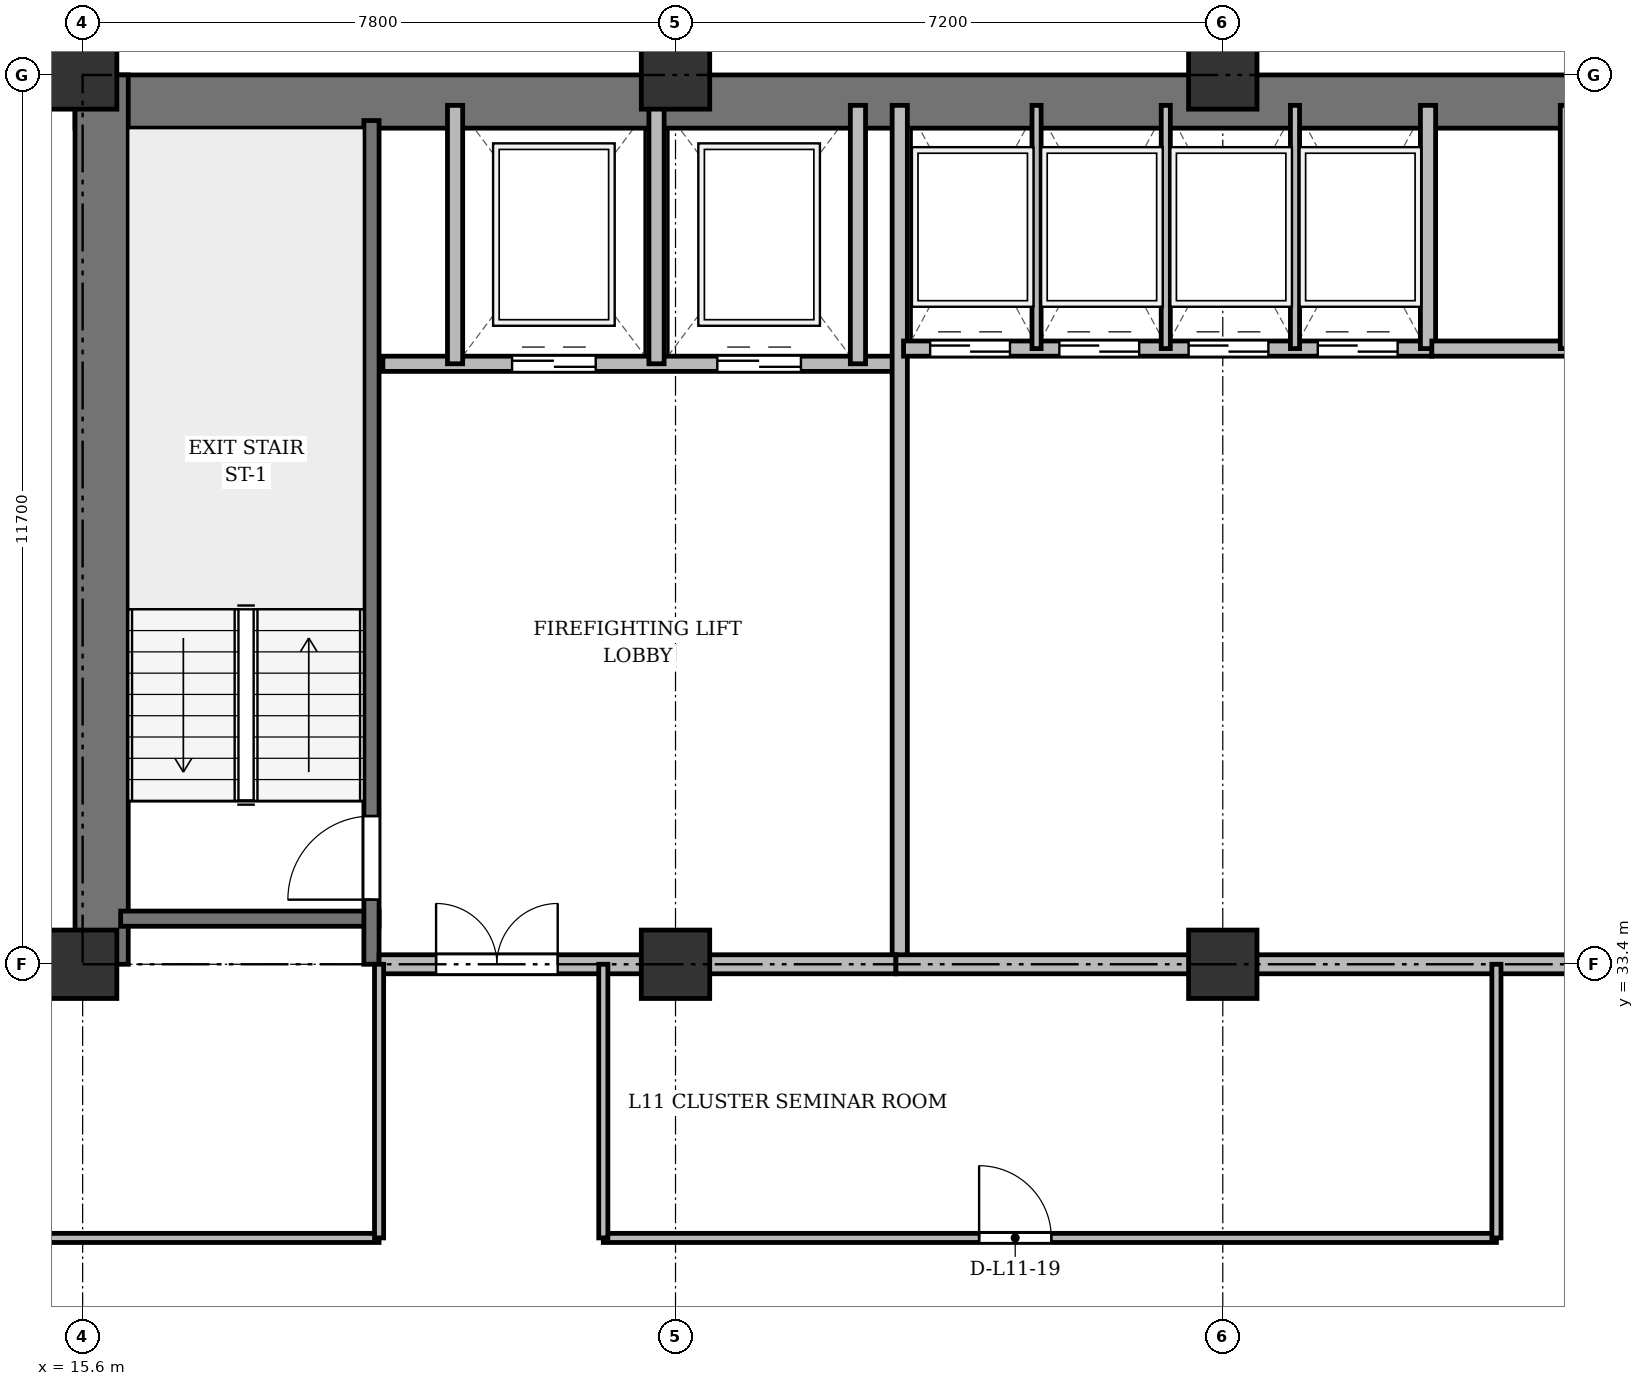
"""IFC4 building model, lengths in metres.
Left out: names, types, materials, properties, quantities, classifications, styles, units other than length and angle.
Written with IfcOpenShell. Run it as: python <this file> out.ifc"""

import sys

from ifc_helpers import new_model, si_unit, direction, frame, frame_2d, origin, origin_2d, place, context, subcontext, project, spatial, rectangle, extrude, source, transform, mapped, element, fill, save


model = new_model("IFC4")
c1 = context("Model", 3, precision=1e-05, world=origin(), true_north=direction((0.0, 1.0)))
c2 = subcontext(c1, "Body", "Model", "MODEL_VIEW")
j1 = project(units=[si_unit("LENGTHUNIT", "METRE"), si_unit("PLANEANGLEUNIT", "RADIAN")], contexts=[c1])
p1 = place(None, origin())
s1 = spatial("IfcSite", under=j1, at=p1, CompositionType="ELEMENT")
p2 = place(p1, origin())
s2 = spatial("IfcBuilding", under=s1, at=p2, CompositionType="ELEMENT")
p3 = place(p2, frame((0.0, 0.0, 45.1)))
s3 = spatial("IfcBuildingStorey", under=s2, at=p3, CompositionType="ELEMENT", Elevation=45.1)
m1 = source(origin(), c2, "Body", "SweptSolid", [
    extrude(rectangle(XDim=0.9, YDim=0.9, at=origin_2d()), origin(), (0.0, 0.0, 1.0), 3.6),
])
for number, where, z_axis, x_axis in (
    (1, (15.6, 33.4, 0.0), (0.0, 0.0, 1.0), (1.0, 0.0, 0.0)),
    (2, (15.6, 45.1, 0.0), (0.0, 0.0, 1.0), (1.0, 0.0, 0.0)),
    (3, (23.4, 33.4, 0.0), (0.0, 0.0, 1.0), (1.0, 0.0, 0.0)),
    (4, (23.4, 45.1, 0.0), (0.0, 0.0, 1.0), (1.0, 0.0, 0.0)),
    (5, (30.6, 33.4, 0.0), (0.0, 0.0, 1.0), (1.0, 0.0, 0.0)),
    (6, (30.6, 45.1, 0.0), (0.0, 0.0, 1.0), (1.0, 0.0, 0.0)),
):
    element("IfcColumn", number, at=place(p3, frame(where, z_axis=z_axis, x_axis=x_axis)), inside=s3, PredefinedType="COLUMN", context=c2, shape_type="MappedRepresentation", body=[
        mapped(m1, transform((0.0, 0.0, 0.0), x_axis=(1.0, 0.0, 0.0), y_axis=(0.0, 1.0, 0.0), z_axis=(0.0, 0.0, 1.0), scale=1.0)),
    ])
p4 = place(p3, frame((15.5, 44.75, 0.0), z_axis=(0.0, 0.0, 1.0), x_axis=(1.0, 0.0, 0.0)))
e7 = element("IfcWall", 7, at=p4, inside=s3, PredefinedType="SHEAR", context=c2, shape_type="SweptSolid", body=[
    extrude(rectangle(XDim=43.4, YDim=0.7, at=frame_2d((21.7, 0.0))), origin(), (0.0, 0.0, 1.0), 3.34),
])
p5 = place(p3, frame((15.85, 33.4, 0.0), z_axis=(0.0, 0.0, 1.0), x_axis=(0.0, 1.0, 0.0)))
e8 = element("IfcWall", 8, at=p5, inside=s3, PredefinedType="SHEAR", context=c2, shape_type="SweptSolid", body=[
    extrude(rectangle(XDim=11.7, YDim=0.7, at=frame_2d((5.85, 0.0))), origin(), (0.0, 0.0, 1.0), 3.34),
])
p6 = place(p3, frame((16.1, 34.0, 0.0), z_axis=(0.0, 0.0, 1.0), x_axis=(1.0, 0.0, 0.0)))
e9 = element("IfcWall", 9, at=p6, inside=s3, PredefinedType="SHEAR", context=c2, shape_type="SweptSolid", body=[
    extrude(rectangle(XDim=3.4, YDim=0.2, at=frame_2d((1.7, 0.0))), origin(), (0.0, 0.0, 1.0), 3.34),
])
p7 = place(p3, frame((19.4, 33.4, 0.0), z_axis=(0.0, 0.0, 1.0), x_axis=(0.0, 1.0, 0.0)))
e10 = element("IfcWall", 10, at=p7, inside=s3, PredefinedType="SHEAR", context=c2, shape_type="SweptSolid", body=[
    extrude(rectangle(XDim=11.1, YDim=0.2, at=frame_2d((5.55, 0.0))), origin(), (0.0, 0.0, 1.0), 3.34),
])
p8 = place(p7, frame((0.85, 0.0, 0.0)))
e11 = element("IfcOpeningElement", 11, at=p8, cuts=e10, PredefinedType="OPENING", context=c2, shape_type="SweptSolid", body=[
    extrude(rectangle(XDim=1.1, YDim=2.15, at=frame_2d((0.55, 1.075))), frame((0.0, 0.11, 0.0), z_axis=(0.0, -1.0, 0.0), x_axis=(1.0, 0.0, 0.0)), (0.0, 0.0, 1.0), 0.22),
])
p9 = place(p3, frame((19.55, 41.3, 0.0), z_axis=(0.0, 0.0, 1.0), x_axis=(1.0, 0.0, 0.0)))
e12 = element("IfcWall", 12, at=p9, inside=s3, PredefinedType="SOLIDWALL", context=c2, shape_type="SweptSolid", body=[
    extrude(rectangle(XDim=6.75, YDim=0.2, at=frame_2d((3.375, 0.0))), origin(), (0.0, 0.0, 1.0), 3.34),
])
p10 = place(p9, frame((1.7, 0.0, 0.0)))
e13 = element("IfcOpeningElement", 13, at=p10, cuts=e12, PredefinedType="OPENING", context=c2, shape_type="SweptSolid", body=[
    extrude(rectangle(XDim=1.1, YDim=2.15, at=frame_2d((0.55, 1.075))), frame((0.0, 0.11, 0.0), z_axis=(0.0, -1.0, 0.0), x_axis=(1.0, 0.0, 0.0)), (0.0, 0.0, 1.0), 0.22),
])
p11 = place(p9, frame((4.4, 0.0, 0.0)))
e14 = element("IfcOpeningElement", 14, at=p11, cuts=e12, PredefinedType="OPENING", context=c2, shape_type="SweptSolid", body=[
    extrude(rectangle(XDim=1.1, YDim=2.15, at=frame_2d((0.55, 1.075))), frame((0.0, 0.11, 0.0), z_axis=(0.0, -1.0, 0.0), x_axis=(1.0, 0.0, 0.0)), (0.0, 0.0, 1.0), 0.22),
])
for number, where, z_axis, x_axis in (
    (15, (20.5, 41.3, 0.0), (0.0, 0.0, 1.0), (0.0, 1.0, 0.0)),
    (16, (23.15, 41.3, 0.0), (0.0, 0.0, 1.0), (0.0, 1.0, 0.0)),
    (17, (25.8, 41.3, 0.0), (0.0, 0.0, 1.0), (0.0, 1.0, 0.0)),
):
    element("IfcWall", number, at=place(p3, frame(where, z_axis=z_axis, x_axis=x_axis)), inside=s3, PredefinedType="SOLIDWALL", context=c2, shape_type="SweptSolid", body=[
        extrude(rectangle(XDim=3.4, YDim=0.2, at=frame_2d((1.7, 0.0))), origin(), (0.0, 0.0, 1.0), 3.34),
    ])
p12 = place(p3, frame((26.35, 33.4, 0.0), z_axis=(0.0, 0.0, 1.0), x_axis=(0.0, 1.0, 0.0)))
e18 = element("IfcWall", 18, at=p12, inside=s3, PredefinedType="SOLIDWALL", context=c2, shape_type="SweptSolid", body=[
    extrude(rectangle(XDim=11.3, YDim=0.2, at=frame_2d((5.65, 0.0))), origin(), (0.0, 0.0, 1.0), 2.69),
])
p13 = place(p3, frame((19.5, 33.4, 0.0), z_axis=(0.0, 0.0, 1.0), x_axis=(1.0, 0.0, 0.0)))
e19 = element("IfcWall", 19, at=p13, inside=s3, PredefinedType="PARTITIONING", context=c2, shape_type="SweptSolid", body=[
    extrude(rectangle(XDim=6.8, YDim=0.25, at=frame_2d((3.4, 0.0))), origin(), (0.0, 0.0, 1.0), 2.69),
])
p14 = place(p13, frame((0.75, 0.0, 0.0)))
e20 = element("IfcOpeningElement", 20, at=p14, cuts=e19, PredefinedType="OPENING", context=c2, shape_type="SweptSolid", body=[
    extrude(rectangle(XDim=1.6, YDim=2.2, at=frame_2d((0.8, 1.1))), frame((0.0, 0.135, 0.0), z_axis=(0.0, -1.0, 0.0), x_axis=(1.0, 0.0, 0.0)), (0.0, 0.0, 1.0), 0.27),
])
p15 = place(p3, frame((26.4, 41.5, 0.0), z_axis=(0.0, 0.0, 1.0), x_axis=(1.0, 0.0, 0.0)))
e21 = element("IfcWall", 21, at=p15, inside=s3, PredefinedType="SOLIDWALL", context=c2, shape_type="SweptSolid", body=[
    extrude(rectangle(XDim=6.95, YDim=0.2, at=frame_2d((3.475, 0.0))), origin(), (0.0, 0.0, 1.0), 3.34),
])
p16 = place(p15, frame((0.35, 0.0, 0.0)))
e22 = element("IfcOpeningElement", 22, at=p16, cuts=e21, PredefinedType="OPENING", context=c2, shape_type="SweptSolid", body=[
    extrude(rectangle(XDim=1.05, YDim=2.15, at=frame_2d((0.525, 1.075))), frame((0.0, 0.11, 0.0), z_axis=(0.0, -1.0, 0.0), x_axis=(1.0, 0.0, 0.0)), (0.0, 0.0, 1.0), 0.22),
])
p17 = place(p15, frame((2.05, 0.0, 0.0)))
e23 = element("IfcOpeningElement", 23, at=p17, cuts=e21, PredefinedType="OPENING", context=c2, shape_type="SweptSolid", body=[
    extrude(rectangle(XDim=1.05, YDim=2.15, at=frame_2d((0.525, 1.075))), frame((0.0, 0.11, 0.0), z_axis=(0.0, -1.0, 0.0), x_axis=(1.0, 0.0, 0.0)), (0.0, 0.0, 1.0), 0.22),
])
p18 = place(p15, frame((3.75, 0.0, 0.0)))
e24 = element("IfcOpeningElement", 24, at=p18, cuts=e21, PredefinedType="OPENING", context=c2, shape_type="SweptSolid", body=[
    extrude(rectangle(XDim=1.05, YDim=2.15, at=frame_2d((0.525, 1.075))), frame((0.0, 0.11, 0.0), z_axis=(0.0, -1.0, 0.0), x_axis=(1.0, 0.0, 0.0)), (0.0, 0.0, 1.0), 0.22),
])
p19 = place(p15, frame((5.45, 0.0, 0.0)))
e25 = element("IfcOpeningElement", 25, at=p19, cuts=e21, PredefinedType="OPENING", context=c2, shape_type="SweptSolid", body=[
    extrude(rectangle(XDim=1.05, YDim=2.15, at=frame_2d((0.525, 1.075))), frame((0.0, 0.11, 0.0), z_axis=(0.0, -1.0, 0.0), x_axis=(1.0, 0.0, 0.0)), (0.0, 0.0, 1.0), 0.22),
])
p20 = place(p3, frame((33.3, 41.5, 0.0), z_axis=(0.0, 0.0, 1.0), x_axis=(0.0, 1.0, 0.0)))
e26 = element("IfcWall", 26, at=p20, inside=s3, PredefinedType="SOLIDWALL", context=c2, shape_type="SweptSolid", body=[
    extrude(rectangle(XDim=3.2, YDim=0.2, at=frame_2d((1.6, 0.0))), origin(), (0.0, 0.0, 1.0), 3.34),
])
for number, where, z_axis, x_axis in (
    (27, (28.15, 41.5, 0.0), (0.0, 0.0, 1.0), (0.0, 1.0, 0.0)),
    (28, (29.85, 41.5, 0.0), (0.0, 0.0, 1.0), (0.0, 1.0, 0.0)),
    (29, (31.55, 41.5, 0.0), (0.0, 0.0, 1.0), (0.0, 1.0, 0.0)),
):
    element("IfcWall", number, at=place(p3, frame(where, z_axis=z_axis, x_axis=x_axis)), inside=s3, PredefinedType="PARTITIONING", context=c2, shape_type="SweptSolid", body=[
        extrude(rectangle(XDim=3.2, YDim=0.12, at=frame_2d((1.6, 0.0))), origin(), (0.0, 0.0, 1.0), 3.34),
    ])
p21 = place(p3, frame((33.35, 41.5, 0.0), z_axis=(0.0, 0.0, 1.0), x_axis=(1.0, 0.0, 0.0)))
e30 = element("IfcWall", 30, at=p21, inside=s3, PredefinedType="SOLIDWALL", context=c2, shape_type="SweptSolid", body=[
    extrude(rectangle(XDim=6.9, YDim=0.2, at=frame_2d((3.45, 0.0))), origin(), (0.0, 0.0, 1.0), 3.34),
])
p22 = place(p3, frame((35.1, 41.5, 0.0), z_axis=(0.0, 0.0, 1.0), x_axis=(0.0, 1.0, 0.0)))
e31 = element("IfcWall", 31, at=p22, inside=s3, PredefinedType="PARTITIONING", context=c2, shape_type="SweptSolid", body=[
    extrude(rectangle(XDim=3.2, YDim=0.12, at=frame_2d((1.6, 0.0))), origin(), (0.0, 0.0, 1.0), 3.34),
])
p23 = place(p3, frame((26.3, 33.4, 0.0), z_axis=(0.0, 0.0, 1.0), x_axis=(1.0, 0.0, 0.0)))
e32 = element("IfcWall", 32, at=p23, inside=s3, PredefinedType="PARTITIONING", context=c2, shape_type="SweptSolid", body=[
    extrude(rectangle(XDim=20.85, YDim=0.25, at=frame_2d((10.425, 0.0))), origin(), (0.0, 0.0, 1.0), 2.69),
])
p24 = place(p23, frame((9.2, 0.0, 0.0)))
e33 = element("IfcOpeningElement", 33, at=p24, cuts=e32, PredefinedType="OPENING", context=c2, shape_type="SweptSolid", body=[
    extrude(rectangle(XDim=1.6, YDim=2.2, at=frame_2d((0.8, 1.1))), frame((0.0, 0.135, 0.0), z_axis=(0.0, -1.0, 0.0), x_axis=(1.0, 0.0, 0.0)), (0.0, 0.0, 1.0), 0.27),
])
p25 = place(p3, frame((4.75, 29.8, 0.0), z_axis=(0.0, 0.0, 1.0), x_axis=(1.0, 0.0, 0.0)))
e34 = element("IfcWall", 34, at=p25, inside=s3, PredefinedType="PARTITIONING", context=c2, shape_type="SweptSolid", body=[
    extrude(rectangle(XDim=14.75, YDim=0.12, at=frame_2d((7.375, 0.0))), origin(), (0.0, 0.0, 1.0), 2.752),
])
p26 = place(p25, frame((6.9, 0.0, 0.0)))
e35 = element("IfcOpeningElement", 35, at=p26, cuts=e34, PredefinedType="OPENING", context=c2, shape_type="SweptSolid", body=[
    extrude(rectangle(XDim=0.95, YDim=2.15, at=frame_2d((0.475, 1.075))), frame((0.0, 0.07, 0.0), z_axis=(0.0, -1.0, 0.0), x_axis=(1.0, 0.0, 0.0)), (0.0, 0.0, 1.0), 0.14),
])
p27 = place(p3, frame((22.45, 29.8, 0.0), z_axis=(0.0, 0.0, 1.0), x_axis=(1.0, 0.0, 0.0)))
e36 = element("IfcWall", 36, at=p27, inside=s3, PredefinedType="PARTITIONING", context=c2, shape_type="SweptSolid", body=[
    extrude(rectangle(XDim=11.75, YDim=0.12, at=frame_2d((5.875, 0.0))), origin(), (0.0, 0.0, 1.0), 2.752),
])
p28 = place(p27, frame((4.944, 0.0, 0.0)))
e37 = element("IfcOpeningElement", 37, at=p28, cuts=e36, PredefinedType="OPENING", context=c2, shape_type="SweptSolid", body=[
    extrude(rectangle(XDim=0.95, YDim=2.15, at=frame_2d((0.475, 1.075))), frame((0.0, 0.07, 0.0), z_axis=(0.0, -1.0, 0.0), x_axis=(1.0, 0.0, 0.0)), (0.0, 0.0, 1.0), 0.14),
])
for number, where, z_axis, x_axis in (
    (38, (19.5, 29.8, 0.0), (0.0, 0.0, 1.0), (0.0, 1.0, 0.0)),
    (39, (22.45, 29.8, 0.0), (0.0, 0.0, 1.0), (0.0, 1.0, 0.0)),
    (40, (34.2, 29.8, 0.0), (0.0, 0.0, 1.0), (0.0, 1.0, 0.0)),
):
    element("IfcWall", number, at=place(p3, frame(where, z_axis=z_axis, x_axis=x_axis)), inside=s3, PredefinedType="PARTITIONING", context=c2, shape_type="SweptSolid", body=[
        extrude(rectangle(XDim=3.6, YDim=0.12, at=frame_2d((1.8, 0.0))), origin(), (0.0, 0.0, 1.0), 2.69),
    ])
p29 = place(p3, frame((4.75, 33.4, 0.0), z_axis=(0.0, 0.0, 1.0), x_axis=(1.0, 0.0, 0.0)))
e41 = element("IfcWall", 41, at=p29, inside=s3, PredefinedType="PARTITIONING", context=c2, shape_type="SweptSolid", body=[
    extrude(rectangle(XDim=10.85, YDim=0.15, at=frame_2d((5.425, 0.0))), origin(), (0.0, 0.0, 1.0), 2.69),
])
p30 = place(p29, frame((4.94, 0.0, 0.0)))
e42 = element("IfcOpeningElement", 42, at=p30, cuts=e41, PredefinedType="OPENING", context=c2, shape_type="SweptSolid", body=[
    extrude(rectangle(XDim=0.95, YDim=2.15, at=frame_2d((0.475, 1.075))), frame((0.0, 0.085, 0.0), z_axis=(0.0, -1.0, 0.0), x_axis=(1.0, 0.0, 0.0)), (0.0, 0.0, 1.0), 0.17),
])
p31 = place(p3, frame((15.6, 44.75, 0.0), z_axis=(0.0, 0.0, 1.0), x_axis=(0.0, 1.0, 0.0)))
e43 = element("IfcWall", 43, at=p31, inside=s3, PredefinedType="PARTITIONING", context=c2, shape_type="SweptSolid", body=[
    extrude(rectangle(XDim=3.61, YDim=0.15, at=frame_2d((1.805, 0.0))), origin(), (0.0, 0.0, 1.0), 2.752),
])
p32 = place(p31, frame((1.1, 0.0, 0.0)))
e44 = element("IfcOpeningElement", 44, at=p32, cuts=e43, PredefinedType="OPENING", context=c2, shape_type="SweptSolid", body=[
    extrude(rectangle(XDim=0.95, YDim=2.15, at=frame_2d((0.475, 1.075))), frame((0.0, 0.085, 0.0), z_axis=(0.0, -1.0, 0.0), x_axis=(1.0, 0.0, 0.0)), (0.0, 0.0, 1.0), 0.17),
])
m2 = source(origin(), c2, "Body", "SweptSolid", [
    extrude(rectangle(XDim=1.1, YDim=2.15, at=frame_2d((0.55, 1.075))), frame((0.0, 0.025, 0.0), z_axis=(0.0, -1.0, 0.0), x_axis=(1.0, 0.0, 0.0)), (0.0, 0.0, 1.0), 0.05),
])
p33 = place(p8, origin())
e45 = element("IfcDoor", 45, at=p33, inside=s3, OperationType="SINGLE_SWING_LEFT", PredefinedType="DOOR", context=c2, shape_type="MappedRepresentation", body=[
    mapped(m2, transform((0.0, 0.0, 0.0), x_axis=(1.0, 0.0, 0.0), y_axis=(0.0, 1.0, 0.0), z_axis=(0.0, 0.0, 1.0), scale=1.0)),
])
fill(e11, e45)
p34 = place(p10, origin())
e46 = element("IfcDoor", 46, at=p34, inside=s3, OperationType="DOUBLE_DOOR_SLIDING", PredefinedType="DOOR", context=c2, shape_type="MappedRepresentation", body=[
    mapped(m2, transform((0.0, 0.0, 0.0), x_axis=(1.0, 0.0, 0.0), y_axis=(0.0, 1.0, 0.0), z_axis=(0.0, 0.0, 1.0), scale=1.0)),
])
fill(e13, e46)
p35 = place(p11, origin())
e47 = element("IfcDoor", 47, at=p35, inside=s3, OperationType="DOUBLE_DOOR_SLIDING", PredefinedType="DOOR", context=c2, shape_type="MappedRepresentation", body=[
    mapped(m2, transform((0.0, 0.0, 0.0), x_axis=(1.0, 0.0, 0.0), y_axis=(0.0, 1.0, 0.0), z_axis=(0.0, 0.0, 1.0), scale=1.0)),
])
fill(e14, e47)
m3 = source(origin(), c2, "Body", "SweptSolid", [
    extrude(rectangle(XDim=1.6, YDim=2.2, at=frame_2d((0.8, 1.1))), frame((0.0, 0.025, 0.0), z_axis=(0.0, -1.0, 0.0), x_axis=(1.0, 0.0, 0.0)), (0.0, 0.0, 1.0), 0.05),
])
p36 = place(p14, origin())
e48 = element("IfcDoor", 48, at=p36, inside=s3, OperationType="DOUBLE_DOOR_SINGLE_SWING", PredefinedType="DOOR", context=c2, shape_type="MappedRepresentation", body=[
    mapped(m3, transform((0.0, 0.0, 0.0), x_axis=(1.0, 0.0, 0.0), y_axis=(0.0, 1.0, 0.0), z_axis=(0.0, 0.0, 1.0), scale=1.0)),
])
fill(e20, e48)
m4 = source(origin(), c2, "Body", "SweptSolid", [
    extrude(rectangle(XDim=1.05, YDim=2.15, at=frame_2d((0.525, 1.075))), frame((0.0, 0.025, 0.0), z_axis=(0.0, -1.0, 0.0), x_axis=(1.0, 0.0, 0.0)), (0.0, 0.0, 1.0), 0.05),
])
p37 = place(p16, origin())
e49 = element("IfcDoor", 49, at=p37, inside=s3, OperationType="DOUBLE_DOOR_SLIDING", PredefinedType="DOOR", context=c2, shape_type="MappedRepresentation", body=[
    mapped(m4, transform((0.0, 0.0, 0.0), x_axis=(1.0, 0.0, 0.0), y_axis=(0.0, 1.0, 0.0), z_axis=(0.0, 0.0, 1.0), scale=1.0)),
])
fill(e22, e49)
p38 = place(p17, origin())
e50 = element("IfcDoor", 50, at=p38, inside=s3, OperationType="DOUBLE_DOOR_SLIDING", PredefinedType="DOOR", context=c2, shape_type="MappedRepresentation", body=[
    mapped(m4, transform((0.0, 0.0, 0.0), x_axis=(1.0, 0.0, 0.0), y_axis=(0.0, 1.0, 0.0), z_axis=(0.0, 0.0, 1.0), scale=1.0)),
])
fill(e23, e50)
p39 = place(p18, origin())
e51 = element("IfcDoor", 51, at=p39, inside=s3, OperationType="DOUBLE_DOOR_SLIDING", PredefinedType="DOOR", context=c2, shape_type="MappedRepresentation", body=[
    mapped(m4, transform((0.0, 0.0, 0.0), x_axis=(1.0, 0.0, 0.0), y_axis=(0.0, 1.0, 0.0), z_axis=(0.0, 0.0, 1.0), scale=1.0)),
])
fill(e24, e51)
p40 = place(p19, origin())
e52 = element("IfcDoor", 52, at=p40, inside=s3, OperationType="DOUBLE_DOOR_SLIDING", PredefinedType="DOOR", context=c2, shape_type="MappedRepresentation", body=[
    mapped(m4, transform((0.0, 0.0, 0.0), x_axis=(1.0, 0.0, 0.0), y_axis=(0.0, 1.0, 0.0), z_axis=(0.0, 0.0, 1.0), scale=1.0)),
])
fill(e25, e52)
m5 = source(origin(), c2, "Body", "SweptSolid", [
    extrude(rectangle(XDim=0.95, YDim=2.15, at=frame_2d((0.475, 1.075))), frame((0.0, 0.025, 0.0), z_axis=(0.0, -1.0, 0.0), x_axis=(1.0, 0.0, 0.0)), (0.0, 0.0, 1.0), 0.05),
])
p41 = place(p28, origin())
e53 = element("IfcDoor", 53, at=p41, inside=s3, OperationType="SINGLE_SWING_LEFT", PredefinedType="DOOR", context=c2, shape_type="MappedRepresentation", body=[
    mapped(m5, transform((0.0, 0.0, 0.0), x_axis=(1.0, 0.0, 0.0), y_axis=(0.0, 1.0, 0.0), z_axis=(0.0, 0.0, 1.0), scale=1.0)),
])
fill(e37, e53)
save(model, sys.argv[1])
